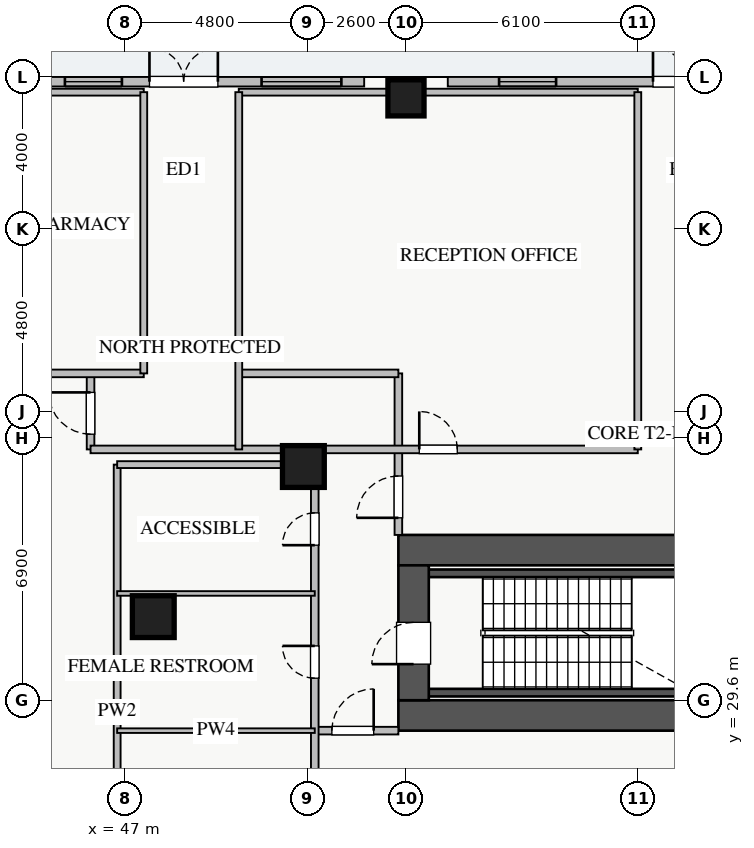
"""IFC4 building model, lengths in metres.
Left out: names, types, materials, properties, quantities, classifications, styles, units other than length and angle.
Written with IfcOpenShell. Run it as: python <this file> out.ifc"""

import sys

from ifc_helpers import new_model, si_unit, direction, frame, frame_2d, origin, origin_2d, place, context, subcontext, project, spatial, rectangle, extrude, source, transform, mapped, element, fill, save


model = new_model("IFC4")
c1 = context("Model", 3, precision=1e-05, world=origin(), true_north=direction((0.0, 1.0)))
c2 = subcontext(c1, "Body", "Model", "MODEL_VIEW")
j1 = project(units=[si_unit("LENGTHUNIT", "METRE"), si_unit("PLANEANGLEUNIT", "RADIAN")], contexts=[c1])
p1 = place(None, origin())
s1 = spatial("IfcSite", under=j1, at=p1, CompositionType="ELEMENT")
p2 = place(p1, origin())
s2 = spatial("IfcBuilding", under=s1, at=p2, CompositionType="ELEMENT")
p3 = place(p2, origin())
s3 = spatial("IfcBuildingStorey", under=s2, at=p3, CompositionType="ELEMENT", Elevation=0.0)
for number, where, z_axis, x_axis in (
    (1, (54.8, 29.8, 0.0), (0.0, 0.0, 1.0), (1.0, 0.0, 0.0)),
    (2, (54.8, 32.94, 0.0), (0.0, 0.0, 1.0), (1.0, 0.0, 0.0)),
):
    element("IfcWall", number, at=place(p3, frame(where, z_axis=z_axis, x_axis=x_axis)), inside=s3, PredefinedType="SHEAR", context=c2, shape_type="SweptSolid", body=[
        extrude(rectangle(XDim=7.15, YDim=0.2, at=frame_2d((3.575, 0.0))), origin(), (0.0, 0.0, 1.0), 5.0),
    ])
p4 = place(p3, frame((54.2, 29.2, 0.0), z_axis=(0.0, 0.0, 1.0), x_axis=(1.0, 0.0, 0.0)))
e3 = element("IfcWall", 3, at=p4, inside=s3, PredefinedType="SHEAR", context=c2, shape_type="SweptSolid", body=[
    extrude(rectangle(XDim=12.6, YDim=0.8, at=frame_2d((6.3, 0.0))), origin(), (0.0, 0.0, 1.0), 5.0),
])
p5 = place(p3, frame((54.2, 33.55, 0.0), z_axis=(0.0, 0.0, 1.0), x_axis=(1.0, 0.0, 0.0)))
e4 = element("IfcWall", 4, at=p5, inside=s3, PredefinedType="SHEAR", context=c2, shape_type="SweptSolid", body=[
    extrude(rectangle(XDim=12.6, YDim=0.8, at=frame_2d((6.3, 0.0))), origin(), (0.0, 0.0, 1.0), 5.0),
])
p6 = place(p5, frame((8.2, 0.0, 0.0)))
e5 = element("IfcOpeningElement", 5, at=p6, cuts=e4, PredefinedType="OPENING", context=c2, shape_type="SweptSolid", body=[
    extrude(rectangle(XDim=1.1, YDim=2.05, at=frame_2d((0.55, 1.025))), frame((0.0, 0.41, 0.0), z_axis=(0.0, -1.0, 0.0), x_axis=(1.0, 0.0, 0.0)), (0.0, 0.0, 1.0), 0.82),
])
p7 = place(p3, frame((54.6, 29.6, 0.0), z_axis=(0.0, 0.0, 1.0), x_axis=(0.0, 1.0, 0.0)))
e6 = element("IfcWall", 6, at=p7, inside=s3, PredefinedType="SHEAR", context=c2, shape_type="SweptSolid", body=[
    extrude(rectangle(XDim=3.55, YDim=0.8, at=frame_2d((1.775, 0.0))), origin(), (0.0, 0.0, 1.0), 5.0),
])
p8 = place(p7, frame((0.95, 0.0, 0.0)))
e7 = element("IfcOpeningElement", 7, at=p8, cuts=e6, PredefinedType="OPENING", context=c2, shape_type="SweptSolid", body=[
    extrude(rectangle(XDim=1.1, YDim=2.05, at=frame_2d((0.55, 1.025))), frame((0.0, 0.41, 0.0), z_axis=(0.0, -1.0, 0.0), x_axis=(1.0, 0.0, 0.0)), (0.0, 0.0, 1.0), 0.82),
])
m1 = source(origin(), c2, "Body", "SweptSolid", [
    extrude(rectangle(XDim=1.1, YDim=1.1, at=origin_2d()), origin(), (0.0, 0.0, 1.0), 5.0),
])
for number, where, z_axis, x_axis in (
    (8, (51.7, 35.75, 0.0), (0.0, 0.0, 1.0), (1.0, 0.0, 0.0)),
    (9, (47.75, 31.8, 0.0), (0.0, 0.0, 1.0), (1.0, 0.0, 0.0)),
):
    element("IfcColumn", number, at=place(p3, frame(where, z_axis=z_axis, x_axis=x_axis)), inside=s3, PredefinedType="COLUMN", context=c2, shape_type="MappedRepresentation", body=[
        mapped(m1, transform((0.0, 0.0, 0.0), x_axis=(1.0, 0.0, 0.0), y_axis=(0.0, 1.0, 0.0), z_axis=(0.0, 0.0, 1.0), scale=1.0)),
    ])
m2 = source(origin(), c2, "Body", "SweptSolid", [
    extrude(rectangle(XDim=0.95, YDim=0.95, at=origin_2d()), origin(), (0.0, 0.0, 1.0), 5.0),
])
p9 = place(p3, frame((54.4, 45.45, 0.0), z_axis=(0.0, 0.0, 1.0), x_axis=(1.0, 0.0, 0.0)))
e10 = element("IfcColumn", 10, at=p9, inside=s3, PredefinedType="COLUMN", context=c2, shape_type="MappedRepresentation", body=[
    mapped(m2, transform((0.0, 0.0, 0.0), x_axis=(1.0, 0.0, 0.0), y_axis=(0.0, 1.0, 0.0), z_axis=(0.0, 0.0, 1.0), scale=1.0)),
])
p10 = place(p3, frame((43.8, 45.875, 0.0), z_axis=(0.0, 0.0, 1.0), x_axis=(1.0, 0.0, 0.0)))
e11 = element("IfcWall", 11, at=p10, inside=s3, PredefinedType="STANDARD", context=c2, shape_type="SweptSolid", body=[
    extrude(rectangle(XDim=9.5, YDim=0.25, at=frame_2d((4.75, 0.0))), origin(), (0.0, 0.0, 1.0), 4.32),
])
p11 = place(p10, frame((3.85, 0.0, 0.0)))
e12 = element("IfcOpeningElement", 12, at=p11, cuts=e11, PredefinedType="OPENING", context=c2, shape_type="SweptSolid", body=[
    extrude(rectangle(XDim=1.8, YDim=2.2, at=frame_2d((0.9, 1.1))), frame((0.0, 0.135, 0.0), z_axis=(0.0, -1.0, 0.0), x_axis=(1.0, 0.0, 0.0)), (0.0, 0.0, 1.0), 0.27),
])
p12 = place(p10, frame((1.625, 0.0, 0.9)))
e13 = element("IfcOpeningElement", 13, at=p12, cuts=e11, PredefinedType="OPENING", context=c2, shape_type="SweptSolid", body=[
    extrude(rectangle(XDim=1.5, YDim=1.45, at=frame_2d((0.75, 0.725))), frame((0.0, 0.135, 0.0), z_axis=(0.0, -1.0, 0.0), x_axis=(1.0, 0.0, 0.0)), (0.0, 0.0, 1.0), 0.27),
])
p13 = place(p10, frame((6.8, 0.0, 0.9)))
e14 = element("IfcOpeningElement", 14, at=p13, cuts=e11, PredefinedType="OPENING", context=c2, shape_type="SweptSolid", body=[
    extrude(rectangle(XDim=2.1, YDim=1.5, at=frame_2d((1.05, 0.75))), frame((0.0, 0.135, 0.0), z_axis=(0.0, -1.0, 0.0), x_axis=(1.0, 0.0, 0.0)), (0.0, 0.0, 1.0), 0.27),
])
p14 = place(p3, frame((55.5, 45.875, 0.0), z_axis=(0.0, 0.0, 1.0), x_axis=(1.0, 0.0, 0.0)))
e15 = element("IfcWall", 15, at=p14, inside=s3, PredefinedType="STANDARD", context=c2, shape_type="SweptSolid", body=[
    extrude(rectangle(XDim=12.6, YDim=0.25, at=frame_2d((6.3, 0.0))), origin(), (0.0, 0.0, 1.0), 4.32),
])
p15 = place(p14, frame((5.4, 0.0, 0.0)))
e16 = element("IfcOpeningElement", 16, at=p15, cuts=e15, PredefinedType="OPENING", context=c2, shape_type="SweptSolid", body=[
    extrude(rectangle(XDim=1.8, YDim=2.2, at=frame_2d((0.9, 1.1))), frame((0.0, 0.135, 0.0), z_axis=(0.0, -1.0, 0.0), x_axis=(1.0, 0.0, 0.0)), (0.0, 0.0, 1.0), 0.27),
])
p16 = place(p14, frame((1.35, 0.0, 0.9)))
e17 = element("IfcOpeningElement", 17, at=p16, cuts=e15, PredefinedType="OPENING", context=c2, shape_type="SweptSolid", body=[
    extrude(rectangle(XDim=1.5, YDim=1.45, at=frame_2d((0.75, 0.725))), frame((0.0, 0.135, 0.0), z_axis=(0.0, -1.0, 0.0), x_axis=(1.0, 0.0, 0.0)), (0.0, 0.0, 1.0), 0.27),
])
p17 = place(p14, frame((9.3, 0.0, 0.9)))
e18 = element("IfcOpeningElement", 18, at=p17, cuts=e15, PredefinedType="OPENING", context=c2, shape_type="SweptSolid", body=[
    extrude(rectangle(XDim=2.4, YDim=1.48, at=frame_2d((1.2, 0.74))), frame((0.0, 0.135, 0.0), z_axis=(0.0, -1.0, 0.0), x_axis=(1.0, 0.0, 0.0)), (0.0, 0.0, 1.0), 0.27),
])
p18 = place(p3, frame((52.0, 28.8, 0.0), z_axis=(0.0, 0.0, 1.0), x_axis=(1.0, 0.0, 0.0)))
e19 = element("IfcWall", 19, at=p18, inside=s3, PredefinedType="PARTITIONING", context=c2, shape_type="SweptSolid", body=[
    extrude(rectangle(XDim=2.2, YDim=0.2, at=frame_2d((1.1, 0.0))), origin(), (0.0, 0.0, 1.0), 4.78),
])
p19 = place(p18, frame((0.45, 0.0, 0.0)))
e20 = element("IfcOpeningElement", 20, at=p19, cuts=e19, PredefinedType="OPENING", context=c2, shape_type="SweptSolid", body=[
    extrude(rectangle(XDim=1.1, YDim=2.05, at=frame_2d((0.55, 1.025))), frame((0.0, 0.11, 0.0), z_axis=(0.0, -1.0, 0.0), x_axis=(1.0, 0.0, 0.0)), (0.0, 0.0, 1.0), 0.22),
])
p20 = place(p3, frame((54.2, 33.95, 0.0), z_axis=(0.0, 0.0, 1.0), x_axis=(0.0, 1.0, 0.0)))
e21 = element("IfcWall", 21, at=p20, inside=s3, PredefinedType="PARTITIONING", context=c2, shape_type="SweptSolid", body=[
    extrude(rectangle(XDim=4.25, YDim=0.2, at=frame_2d((2.125, 0.0))), origin(), (0.0, 0.0, 1.0), 4.78),
])
p21 = place(p20, frame((0.45, 0.0, 0.0)))
e22 = element("IfcOpeningElement", 22, at=p21, cuts=e21, PredefinedType="OPENING", context=c2, shape_type="SweptSolid", body=[
    extrude(rectangle(XDim=1.1, YDim=2.05, at=frame_2d((0.55, 1.025))), frame((0.0, 0.11, 0.0), z_axis=(0.0, -1.0, 0.0), x_axis=(1.0, 0.0, 0.0)), (0.0, 0.0, 1.0), 0.22),
])
p22 = place(p3, frame((52.0, 25.2, 0.0), z_axis=(0.0, 0.0, 1.0), x_axis=(0.0, 1.0, 0.0)))
e23 = element("IfcWall", 23, at=p22, inside=s3, PredefinedType="PARTITIONING", context=c2, shape_type="SweptSolid", body=[
    extrude(rectangle(XDim=11.0, YDim=0.2, at=frame_2d((5.5, 0.0))), origin(), (0.0, 0.0, 1.0), 4.78),
])
p23 = place(p22, frame((1.375, 0.0, 0.0)))
e24 = element("IfcOpeningElement", 24, at=p23, cuts=e23, PredefinedType="OPENING", context=c2, shape_type="SweptSolid", body=[
    extrude(rectangle(XDim=0.85, YDim=2.05, at=frame_2d((0.425, 1.025))), frame((0.0, 0.11, 0.0), z_axis=(0.0, -1.0, 0.0), x_axis=(1.0, 0.0, 0.0)), (0.0, 0.0, 1.0), 0.22),
])
p24 = place(p22, frame((4.98, 0.0, 0.0)))
e25 = element("IfcOpeningElement", 25, at=p24, cuts=e23, PredefinedType="OPENING", context=c2, shape_type="SweptSolid", body=[
    extrude(rectangle(XDim=0.85, YDim=2.05, at=frame_2d((0.425, 1.025))), frame((0.0, 0.11, 0.0), z_axis=(0.0, -1.0, 0.0), x_axis=(1.0, 0.0, 0.0)), (0.0, 0.0, 1.0), 0.22),
])
p25 = place(p22, frame((8.48, 0.0, 0.0)))
e26 = element("IfcOpeningElement", 26, at=p25, cuts=e23, PredefinedType="OPENING", context=c2, shape_type="SweptSolid", body=[
    extrude(rectangle(XDim=0.85, YDim=2.05, at=frame_2d((0.425, 1.025))), frame((0.0, 0.11, 0.0), z_axis=(0.0, -1.0, 0.0), x_axis=(1.0, 0.0, 0.0)), (0.0, 0.0, 1.0), 0.22),
])
p26 = place(p3, frame((46.1, 36.2, 0.0), z_axis=(0.0, 0.0, 1.0), x_axis=(0.0, 1.0, 0.0)))
e27 = element("IfcWall", 27, at=p26, inside=s3, PredefinedType="PARTITIONING", context=c2, shape_type="SweptSolid", body=[
    extrude(rectangle(XDim=2.0, YDim=0.2, at=frame_2d((1.0, 0.0))), origin(), (0.0, 0.0, 1.0), 4.78),
])
p27 = place(p26, frame((0.4, 0.0, 0.0)))
e28 = element("IfcOpeningElement", 28, at=p27, cuts=e27, PredefinedType="OPENING", context=c2, shape_type="SweptSolid", body=[
    extrude(rectangle(XDim=1.1, YDim=2.05, at=frame_2d((0.55, 1.025))), frame((0.0, 0.11, 0.0), z_axis=(0.0, -1.0, 0.0), x_axis=(1.0, 0.0, 0.0)), (0.0, 0.0, 1.0), 0.22),
])
p28 = place(p3, frame((46.1, 36.2, 0.0), z_axis=(0.0, 0.0, 1.0), x_axis=(1.0, 0.0, 0.0)))
e29 = element("IfcWall", 29, at=p28, inside=s3, PredefinedType="PARTITIONING", context=c2, shape_type="SweptSolid", body=[
    extrude(rectangle(XDim=14.4, YDim=0.2, at=frame_2d((7.2, 0.0))), origin(), (0.0, 0.0, 1.0), 4.78),
])
p29 = place(p28, frame((8.65, 0.0, 0.0)))
e30 = element("IfcOpeningElement", 30, at=p29, cuts=e29, PredefinedType="OPENING", context=c2, shape_type="SweptSolid", body=[
    extrude(rectangle(XDim=1.0, YDim=2.05, at=frame_2d((0.5, 1.025))), frame((0.0, 0.11, 0.0), z_axis=(0.0, -1.0, 0.0), x_axis=(1.0, 0.0, 0.0)), (0.0, 0.0, 1.0), 0.22),
])
p30 = place(p3, frame((50.0, 38.2, 0.0), z_axis=(0.0, 0.0, 1.0), x_axis=(1.0, 0.0, 0.0)))
e31 = element("IfcWall", 31, at=p30, inside=s3, PredefinedType="PARTITIONING", context=c2, shape_type="SweptSolid", body=[
    extrude(rectangle(XDim=4.2, YDim=0.2, at=frame_2d((2.1, 0.0))), origin(), (0.0, 0.0, 1.0), 4.78),
])
p31 = place(p3, frame((35.0, 38.2, 0.0), z_axis=(0.0, 0.0, 1.0), x_axis=(1.0, 0.0, 0.0)))
e32 = element("IfcWall", 32, at=p31, inside=s3, PredefinedType="PARTITIONING", context=c2, shape_type="SweptSolid", body=[
    extrude(rectangle(XDim=12.5, YDim=0.2, at=frame_2d((6.25, 0.0))), origin(), (0.0, 0.0, 1.0), 4.78),
])
p32 = place(p31, frame((5.75, 0.0, 0.0)))
e33 = element("IfcOpeningElement", 33, at=p32, cuts=e32, PredefinedType="OPENING", context=c2, shape_type="SweptSolid", body=[
    extrude(rectangle(XDim=1.0, YDim=2.05, at=frame_2d((0.5, 1.025))), frame((0.0, 0.11, 0.0), z_axis=(0.0, -1.0, 0.0), x_axis=(1.0, 0.0, 0.0)), (0.0, 0.0, 1.0), 0.22),
])
p33 = place(p3, frame((46.8, 25.2, 0.0), z_axis=(0.0, 0.0, 1.0), x_axis=(0.0, 1.0, 0.0)))
e34 = element("IfcWall", 34, at=p33, inside=s3, PredefinedType="PARTITIONING", context=c2, shape_type="SweptSolid", body=[
    extrude(rectangle(XDim=10.6, YDim=0.18, at=frame_2d((5.3, 0.0))), origin(), (0.0, 0.0, 1.0), 4.78),
])
p34 = place(p3, frame((46.8, 35.8, 0.0), z_axis=(0.0, 0.0, 1.0), x_axis=(1.0, 0.0, 0.0)))
e35 = element("IfcWall", 35, at=p34, inside=s3, PredefinedType="PARTITIONING", context=c2, shape_type="SweptSolid", body=[
    extrude(rectangle(XDim=5.2, YDim=0.18, at=frame_2d((2.6, 0.0))), origin(), (0.0, 0.0, 1.0), 4.78),
])
for number, where, z_axis, x_axis in (
    (36, (46.8, 28.8, 0.0), (0.0, 0.0, 1.0), (1.0, 0.0, 0.0)),
    (37, (46.8, 32.41, 0.0), (0.0, 0.0, 1.0), (1.0, 0.0, 0.0)),
):
    element("IfcWall", number, at=place(p3, frame(where, z_axis=z_axis, x_axis=x_axis)), inside=s3, PredefinedType="PLUMBINGWALL", context=c2, shape_type="SweptSolid", body=[
        extrude(rectangle(XDim=5.2, YDim=0.12, at=frame_2d((2.6, 0.0))), origin(), (0.0, 0.0, 1.0), 4.78),
    ])
p35 = place(p3, frame((35.0, 45.6, 0.0), z_axis=(0.0, 0.0, 1.0), x_axis=(1.0, 0.0, 0.0)))
e38 = element("IfcWall", 38, at=p35, inside=s3, PredefinedType="PARTITIONING", context=c2, shape_type="SweptSolid", body=[
    extrude(rectangle(XDim=12.5, YDim=0.18, at=frame_2d((6.25, 0.0))), origin(), (0.0, 0.0, 1.0), 4.78),
])
p36 = place(p3, frame((47.5, 38.2, 0.0), z_axis=(0.0, 0.0, 1.0), x_axis=(0.0, 1.0, 0.0)))
e39 = element("IfcWall", 39, at=p36, inside=s3, PredefinedType="PARTITIONING", context=c2, shape_type="SweptSolid", body=[
    extrude(rectangle(XDim=7.4, YDim=0.18, at=frame_2d((3.7, 0.0))), origin(), (0.0, 0.0, 1.0), 4.78),
])
p37 = place(p3, frame((50.0, 45.6, 0.0), z_axis=(0.0, 0.0, 1.0), x_axis=(1.0, 0.0, 0.0)))
e40 = element("IfcWall", 40, at=p37, inside=s3, PredefinedType="PARTITIONING", context=c2, shape_type="SweptSolid", body=[
    extrude(rectangle(XDim=10.5, YDim=0.18, at=frame_2d((5.25, 0.0))), origin(), (0.0, 0.0, 1.0), 4.78),
])
for number, where, z_axis, x_axis in (
    (41, (50.0, 36.2, 0.0), (0.0, 0.0, 1.0), (0.0, 1.0, 0.0)),
    (42, (60.5, 36.2, 0.0), (0.0, 0.0, 1.0), (0.0, 1.0, 0.0)),
):
    element("IfcWall", number, at=place(p3, frame(where, z_axis=z_axis, x_axis=x_axis)), inside=s3, PredefinedType="PARTITIONING", context=c2, shape_type="SweptSolid", body=[
        extrude(rectangle(XDim=9.4, YDim=0.18, at=frame_2d((4.7, 0.0))), origin(), (0.0, 0.0, 1.0), 4.78),
    ])
m3 = source(origin(), c2, "Body", "SweptSolid", [
    extrude(rectangle(XDim=1.8, YDim=2.2, at=frame_2d((0.9, 1.1))), frame((0.0, 0.025, 0.0), z_axis=(0.0, -1.0, 0.0), x_axis=(1.0, 0.0, 0.0)), (0.0, 0.0, 1.0), 0.05),
])
p38 = place(p11, origin())
e43 = element("IfcDoor", 43, at=p38, inside=s3, OperationType="DOUBLE_DOOR_SINGLE_SWING", PredefinedType="DOOR", context=c2, shape_type="MappedRepresentation", body=[
    mapped(m3, transform((0.0, 0.0, 0.0), x_axis=(1.0, 0.0, 0.0), y_axis=(0.0, 1.0, 0.0), z_axis=(0.0, 0.0, 1.0), scale=1.0)),
])
fill(e12, e43)
m4 = source(origin(), c2, "Body", "SweptSolid", [
    extrude(rectangle(XDim=1.5, YDim=1.45, at=frame_2d((0.75, 0.725))), frame((0.0, 0.03, 0.0), z_axis=(0.0, -1.0, 0.0), x_axis=(1.0, 0.0, 0.0)), (0.0, 0.0, 1.0), 0.06),
])
p39 = place(p12, origin())
e44 = element("IfcWindow", 44, at=p39, inside=s3, PartitioningType="DOUBLE_PANEL_VERTICAL", PredefinedType="WINDOW", context=c2, shape_type="MappedRepresentation", body=[
    mapped(m4, transform((0.0, 0.0, 0.0), x_axis=(1.0, 0.0, 0.0), y_axis=(0.0, 1.0, 0.0), z_axis=(0.0, 0.0, 1.0), scale=1.0)),
])
fill(e13, e44)
m5 = source(origin(), c2, "Body", "SweptSolid", [
    extrude(rectangle(XDim=2.1, YDim=1.5, at=frame_2d((1.05, 0.75))), frame((0.0, 0.03, 0.0), z_axis=(0.0, -1.0, 0.0), x_axis=(1.0, 0.0, 0.0)), (0.0, 0.0, 1.0), 0.06),
])
p40 = place(p13, origin())
e45 = element("IfcWindow", 45, at=p40, inside=s3, PartitioningType="TRIPLE_PANEL_VERTICAL", PredefinedType="WINDOW", context=c2, shape_type="MappedRepresentation", body=[
    mapped(m5, transform((0.0, 0.0, 0.0), x_axis=(1.0, 0.0, 0.0), y_axis=(0.0, 1.0, 0.0), z_axis=(0.0, 0.0, 1.0), scale=1.0)),
])
fill(e14, e45)
p41 = place(p15, origin())
e46 = element("IfcDoor", 46, at=p41, inside=s3, OperationType="DOUBLE_DOOR_SINGLE_SWING", PredefinedType="DOOR", context=c2, shape_type="MappedRepresentation", body=[
    mapped(m3, transform((0.0, 0.0, 0.0), x_axis=(1.0, 0.0, 0.0), y_axis=(0.0, 1.0, 0.0), z_axis=(0.0, 0.0, 1.0), scale=1.0)),
])
fill(e16, e46)
p42 = place(p16, origin())
e47 = element("IfcWindow", 47, at=p42, inside=s3, PartitioningType="DOUBLE_PANEL_VERTICAL", PredefinedType="WINDOW", context=c2, shape_type="MappedRepresentation", body=[
    mapped(m4, transform((0.0, 0.0, 0.0), x_axis=(1.0, 0.0, 0.0), y_axis=(0.0, 1.0, 0.0), z_axis=(0.0, 0.0, 1.0), scale=1.0)),
])
fill(e17, e47)
m6 = source(origin(), c2, "Body", "SweptSolid", [
    extrude(rectangle(XDim=1.1, YDim=2.05, at=frame_2d((0.55, 1.025))), frame((0.0, 0.025, 0.0), z_axis=(0.0, -1.0, 0.0), x_axis=(1.0, 0.0, 0.0)), (0.0, 0.0, 1.0), 0.05),
])
p43 = place(p8, origin())
e48 = element("IfcDoor", 48, at=p43, inside=s3, OperationType="SINGLE_SWING_LEFT", PredefinedType="DOOR", context=c2, shape_type="MappedRepresentation", body=[
    mapped(m6, transform((0.0, 0.0, 0.0), x_axis=(1.0, 0.0, 0.0), y_axis=(0.0, 1.0, 0.0), z_axis=(0.0, 0.0, 1.0), scale=1.0)),
])
fill(e7, e48)
p44 = place(p19, origin())
e49 = element("IfcDoor", 49, at=p44, inside=s3, OperationType="SINGLE_SWING_RIGHT", PredefinedType="DOOR", context=c2, shape_type="MappedRepresentation", body=[
    mapped(m6, transform((0.0, 0.0, 0.0), x_axis=(1.0, 0.0, 0.0), y_axis=(0.0, 1.0, 0.0), z_axis=(0.0, 0.0, 1.0), scale=1.0)),
])
fill(e20, e49)
p45 = place(p21, origin())
e50 = element("IfcDoor", 50, at=p45, inside=s3, OperationType="SINGLE_SWING_LEFT", PredefinedType="DOOR", context=c2, shape_type="MappedRepresentation", body=[
    mapped(m6, transform((0.0, 0.0, 0.0), x_axis=(1.0, 0.0, 0.0), y_axis=(0.0, 1.0, 0.0), z_axis=(0.0, 0.0, 1.0), scale=1.0)),
])
fill(e22, e50)
m7 = source(origin(), c2, "Body", "SweptSolid", [
    extrude(rectangle(XDim=0.85, YDim=2.05, at=frame_2d((0.425, 1.025))), frame((0.0, 0.025, 0.0), z_axis=(0.0, -1.0, 0.0), x_axis=(1.0, 0.0, 0.0)), (0.0, 0.0, 1.0), 0.05),
])
p46 = place(p24, origin())
e51 = element("IfcDoor", 51, at=p46, inside=s3, OperationType="SINGLE_SWING_RIGHT", PredefinedType="DOOR", context=c2, shape_type="MappedRepresentation", body=[
    mapped(m7, transform((0.0, 0.0, 0.0), x_axis=(1.0, 0.0, 0.0), y_axis=(0.0, 1.0, 0.0), z_axis=(0.0, 0.0, 1.0), scale=1.0)),
])
fill(e25, e51)
p47 = place(p25, origin())
e52 = element("IfcDoor", 52, at=p47, inside=s3, OperationType="SINGLE_SWING_LEFT", PredefinedType="DOOR", context=c2, shape_type="MappedRepresentation", body=[
    mapped(m7, transform((0.0, 0.0, 0.0), x_axis=(1.0, 0.0, 0.0), y_axis=(0.0, 1.0, 0.0), z_axis=(0.0, 0.0, 1.0), scale=1.0)),
])
fill(e26, e52)
p48 = place(p27, origin())
e53 = element("IfcDoor", 53, at=p48, inside=s3, OperationType="SINGLE_SWING_RIGHT", PredefinedType="DOOR", context=c2, shape_type="MappedRepresentation", body=[
    mapped(m6, transform((0.0, 0.0, 0.0), x_axis=(1.0, 0.0, 0.0), y_axis=(0.0, 1.0, 0.0), z_axis=(0.0, 0.0, 1.0), scale=1.0)),
])
fill(e28, e53)
m8 = source(origin(), c2, "Body", "SweptSolid", [
    extrude(rectangle(XDim=1.0, YDim=2.05, at=frame_2d((0.5, 1.025))), frame((0.0, 0.025, 0.0), z_axis=(0.0, -1.0, 0.0), x_axis=(1.0, 0.0, 0.0)), (0.0, 0.0, 1.0), 0.05),
])
p49 = place(p29, origin())
e54 = element("IfcDoor", 54, at=p49, inside=s3, OperationType="SINGLE_SWING_LEFT", PredefinedType="DOOR", context=c2, shape_type="MappedRepresentation", body=[
    mapped(m8, transform((0.0, 0.0, 0.0), x_axis=(1.0, 0.0, 0.0), y_axis=(0.0, 1.0, 0.0), z_axis=(0.0, 0.0, 1.0), scale=1.0)),
])
fill(e30, e54)
save(model, sys.argv[1])
